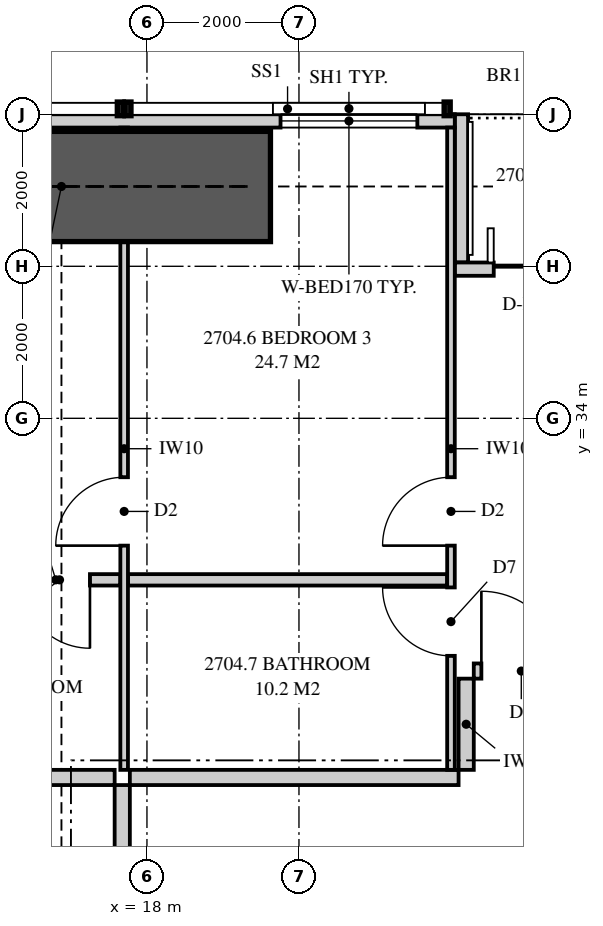
"""IFC4 building model, lengths in metres.
Left out: names, types, materials, properties, quantities, classifications, styles, units other than length and angle.
Written with IfcOpenShell. Run it as: python <this file> out.ifc"""

import sys

from ifc_helpers import new_model, si_unit, direction, frame, frame_2d, origin, place, context, subcontext, project, spatial, polyline, rectangle, outline, extrude, element, fill, save


model = new_model("IFC4")
c1 = context("Model", 3, precision=1e-05, world=origin(), true_north=direction((0.0, 1.0)))
c2 = subcontext(c1, "Body", "Model", "MODEL_VIEW")
j1 = project(units=[si_unit("LENGTHUNIT", "METRE"), si_unit("PLANEANGLEUNIT", "RADIAN")], contexts=[c1])
p1 = place(None, origin())
s1 = spatial("IfcSite", under=j1, at=p1, CompositionType="ELEMENT")
p2 = place(p1, origin())
s2 = spatial("IfcBuilding", under=s1, at=p2, CompositionType="ELEMENT")
p3 = place(p2, frame((0.0, 0.0, 101.5)))
s3 = spatial("IfcBuildingStorey", under=s2, at=p3, CompositionType="ELEMENT", Elevation=101.5)
p4 = place(p3, frame((22.05, 37.913, 0.0), z_axis=(0.0, 0.0, 1.0), x_axis=(-1.0, 0.0, 0.0)))
e1 = element("IfcWall", 1, at=p4, inside=s3, PredefinedType="SOLIDWALL", context=c2, shape_type="SweptSolid", body=[
    extrude(outline(polyline([(0.0, 0.0), (12.999, 0.0), (12.999, 3.11), (5.378, 3.11), (5.378, 2.15), (5.333, 2.15), (5.333, 3.11), (5.175, 3.11), (5.175, 2.15), (0.0, 2.15), (0.0, 0.0)])), frame((0.0, 0.087, 0.0), z_axis=(0.0, -1.0, 0.0), x_axis=(1.0, 0.0, 0.0)), (0.0, 0.0, 1.0), 0.175),
])
p5 = place(p4, frame((0.492, 0.0, 0.4)))
e2 = element("IfcOpeningElement", 2, at=p5, cuts=e1, PredefinedType="OPENING", context=c2, shape_type="SweptSolid", body=[
    extrude(rectangle(XDim=1.8, YDim=1.7, at=frame_2d((0.9, 0.85))), frame((0.0, 0.097, 0.0), z_axis=(0.0, -1.0, 0.0), x_axis=(1.0, 0.0, 0.0)), (0.0, 0.0, 1.0), 0.195),
])
p6 = place(p4, frame((8.065, 0.0, 0.4)))
e3 = element("IfcOpeningElement", 3, at=p6, cuts=e1, PredefinedType="OPENING", context=c2, shape_type="SweptSolid", body=[
    extrude(rectangle(XDim=1.8, YDim=1.7, at=frame_2d((0.9, 0.85))), frame((0.0, 0.097, 0.0), z_axis=(0.0, -1.0, 0.0), x_axis=(1.0, 0.0, 0.0)), (0.0, 0.0, 1.0), 0.195),
])
p7 = place(p3, frame((24.875, 35.962, 0.0), z_axis=(0.0, 0.0, 1.0), x_axis=(-1.0, 0.0, 0.0)))
e4 = element("IfcWall", 4, at=p7, inside=s3, PredefinedType="SOLIDWALL", context=c2, shape_type="SweptSolid", body=[
    extrude(rectangle(XDim=2.825, YDim=0.175, at=frame_2d((1.413, 0.0))), origin(), (0.0, 0.0, 1.0), 3.11),
])
p8 = place(p7, frame((0.512, 0.0, 0.0)))
e5 = element("IfcOpeningElement", 5, at=p8, cuts=e4, PredefinedType="OPENING", context=c2, shape_type="SweptSolid", body=[
    extrude(rectangle(XDim=1.8, YDim=2.1, at=frame_2d((0.9, 1.05))), frame((0.0, 0.097, 0.0), z_axis=(0.0, -1.0, 0.0), x_axis=(1.0, 0.0, 0.0)), (0.0, 0.0, 1.0), 0.195),
])
p9 = place(p3, frame((22.137, 38.0, 0.0), z_axis=(0.0, 0.0, 1.0), x_axis=(0.0, -1.0, 0.0)))
e6 = element("IfcWall", 6, at=p9, inside=s3, PredefinedType="SOLIDWALL", context=c2, shape_type="SweptSolid", body=[
    extrude(outline(polyline([(0.0, 0.0), (1.95, 0.0), (1.95, 3.11), (1.75, 3.11), (1.75, 2.15), (0.15, 2.15), (0.15, 3.11), (0.0, 3.11), (0.0, 0.0)])), frame((0.0, 0.087, 0.0), z_axis=(0.0, -1.0, 0.0), x_axis=(1.0, 0.0, 0.0)), (0.0, 0.0, 1.0), 0.175),
])
p10 = place(p3, frame((17.775, 29.275, 0.0), z_axis=(0.0, 0.0, 1.0), x_axis=(1.0, 0.0, 0.0)))
e7 = element("IfcWall", 7, at=p10, inside=s3, PredefinedType="PARTITIONING", context=c2, shape_type="SweptSolid", body=[
    extrude(rectangle(XDim=4.325, YDim=0.2, at=frame_2d((2.163, 0.0))), origin(), (0.0, 0.0, 1.0), 3.11),
])
p11 = place(p3, frame((17.7, 37.825, 0.0), z_axis=(0.0, 0.0, 1.0), x_axis=(0.0, -1.0, 0.0)))
e8 = element("IfcWall", 8, at=p11, inside=s3, PredefinedType="PARTITIONING", context=c2, shape_type="SweptSolid", body=[
    extrude(outline(polyline([(1.635, 2.15), (0.0, 2.15), (0.0, 0.0), (8.45, 0.0), (8.45, 3.11), (1.635, 3.11), (1.635, 2.15)]), holes=[polyline([(1.021, 0.116), (0.529, 0.116), (0.529, 0.906), (1.021, 0.906), (1.021, 0.116)]), polyline([(1.021, 1.244), (0.529, 1.244), (0.529, 2.034), (1.021, 2.034), (1.021, 1.244)])]), frame((0.0, 0.05, 0.0), z_axis=(0.0, -1.0, 0.0), x_axis=(1.0, 0.0, 0.0)), (0.0, 0.0, 1.0), 0.1),
])
p12 = place(p11, frame((4.6, 0.0, 0.0)))
e9 = element("IfcOpeningElement", 9, at=p12, cuts=e8, PredefinedType="OPENING", context=c2, shape_type="SweptSolid", body=[
    extrude(rectangle(XDim=0.9, YDim=2.1, at=frame_2d((0.45, 1.05))), frame((0.0, 0.06, 0.0), z_axis=(0.0, -1.0, 0.0), x_axis=(1.0, 0.0, 0.0)), (0.0, 0.0, 1.0), 0.12),
])
p13 = place(p3, frame((22.0, 37.825, 0.0), z_axis=(0.0, 0.0, 1.0), x_axis=(0.0, -1.0, 0.0)))
e10 = element("IfcWall", 10, at=p13, inside=s3, PredefinedType="PARTITIONING", context=c2, shape_type="SweptSolid", body=[
    extrude(outline(polyline([(0.0, 0.0), (8.45, 0.0), (8.45, 3.11), (1.635, 3.11), (1.635, 2.15), (0.0, 2.15), (0.0, 3.11), (0.0, 0.0)])), frame((0.0, 0.05, 0.0), z_axis=(0.0, -1.0, 0.0), x_axis=(1.0, 0.0, 0.0)), (0.0, 0.0, 1.0), 0.1),
])
p14 = place(p13, frame((4.6, 0.0, 0.0)))
e11 = element("IfcOpeningElement", 11, at=p14, cuts=e10, PredefinedType="OPENING", context=c2, shape_type="SweptSolid", body=[
    extrude(rectangle(XDim=0.9, YDim=2.1, at=frame_2d((0.45, 1.05))), frame((0.0, 0.06, 0.0), z_axis=(0.0, -1.0, 0.0), x_axis=(1.0, 0.0, 0.0)), (0.0, 0.0, 1.0), 0.12),
])
p15 = place(p13, frame((6.05, 0.0, 0.0)))
e12 = element("IfcOpeningElement", 12, at=p15, cuts=e10, PredefinedType="OPENING", context=c2, shape_type="SweptSolid", body=[
    extrude(rectangle(XDim=0.9, YDim=2.1, at=frame_2d((0.45, 1.05))), frame((0.0, 0.06, 0.0), z_axis=(0.0, -1.0, 0.0), x_axis=(1.0, 0.0, 0.0)), (0.0, 0.0, 1.0), 0.12),
])
p16 = place(p3, frame((11.75, 31.875, 0.0), z_axis=(0.0, 0.0, 1.0), x_axis=(1.0, 0.0, 0.0)))
e13 = element("IfcWall", 13, at=p16, inside=s3, PredefinedType="PLUMBINGWALL", context=c2, shape_type="SweptSolid", body=[
    extrude(outline(polyline([(0.0, 0.0), (5.9, 0.0), (5.9, 3.11), (5.438, 3.11), (5.438, 2.541), (4.812, 2.541), (4.812, 3.11), (0.0, 3.11), (0.0, 0.0)])), frame((0.0, 0.075, 0.0), z_axis=(0.0, -1.0, 0.0), x_axis=(1.0, 0.0, 0.0)), (0.0, 0.0, 1.0), 0.15),
])
p17 = place(p16, frame((4.6, 0.0, 0.0)))
e14 = element("IfcOpeningElement", 14, at=p17, cuts=e13, PredefinedType="OPENING", context=c2, shape_type="SweptSolid", body=[
    extrude(rectangle(XDim=0.9, YDim=2.1, at=frame_2d((0.45, 1.05))), frame((0.0, 0.085, 0.0), z_axis=(0.0, -1.0, 0.0), x_axis=(1.0, 0.0, 0.0)), (0.0, 0.0, 1.0), 0.17),
])
p18 = place(p3, frame((17.75, 31.875, 0.0), z_axis=(0.0, 0.0, 1.0), x_axis=(1.0, 0.0, 0.0)))
e15 = element("IfcWall", 15, at=p18, inside=s3, PredefinedType="PLUMBINGWALL", context=c2, shape_type="SweptSolid", body=[
    extrude(rectangle(XDim=4.2, YDim=0.15, at=frame_2d((2.1, 0.0))), origin(), (0.0, 0.0, 1.0), 3.11),
])
p19 = place(p3, frame((6.0, 29.275, 0.0), z_axis=(0.0, 0.0, 1.0), x_axis=(1.0, 0.0, 0.0)))
e16 = element("IfcWall", 16, at=p19, inside=s3, PredefinedType="PARTITIONING", context=c2, shape_type="SweptSolid", body=[
    extrude(outline(polyline([(0.0, 0.0), (11.575, 0.0), (11.575, 3.11), (11.212, 3.11), (11.212, 2.541), (10.538, 2.541), (10.538, 3.11), (5.51, 3.11), (5.51, 2.51), (2.969, 2.51), (2.969, 2.541), (2.565, 2.541), (2.565, 2.15), (0.721, 2.15), (0.721, 3.11), (0.0, 3.11), (0.0, 0.0)])), frame((0.0, 0.1, 0.0), z_axis=(0.0, -1.0, 0.0), x_axis=(1.0, 0.0, 0.0)), (0.0, 0.0, 1.0), 0.2),
])
p20 = place(p3, frame((22.3, 30.675, 0.0), z_axis=(0.0, 0.0, 1.0), x_axis=(1.0, 0.0, 0.0)))
e17 = element("IfcWall", 17, at=p20, inside=s3, PredefinedType="PARTITIONING", context=c2, shape_type="SweptSolid", body=[
    extrude(rectangle(XDim=2.4, YDim=0.2, at=frame_2d((1.2, 0.0))), origin(), (0.0, 0.0, 1.0), 3.11),
])
p21 = place(p20, frame((0.1, 0.0, 0.0)))
e18 = element("IfcOpeningElement", 18, at=p21, cuts=e17, PredefinedType="OPENING", context=c2, shape_type="SweptSolid", body=[
    extrude(rectangle(XDim=1.05, YDim=2.2, at=frame_2d((0.525, 1.1))), frame((0.0, 0.11, 0.0), z_axis=(0.0, -1.0, 0.0), x_axis=(1.0, 0.0, 0.0)), (0.0, 0.0, 1.0), 0.22),
])
p22 = place(p3, frame((22.2, 29.375, 0.0), z_axis=(0.0, 0.0, 1.0), x_axis=(0.0, 1.0, 0.0)))
e19 = element("IfcWall", 19, at=p22, inside=s3, PredefinedType="PARTITIONING", context=c2, shape_type="SweptSolid", body=[
    extrude(rectangle(XDim=1.2, YDim=0.2, at=frame_2d((0.6, 0.0))), origin(), (0.0, 0.0, 1.0), 3.11),
])
p23 = place(p3, frame((17.675, 23.238, 0.0), z_axis=(0.0, 0.0, 1.0), x_axis=(0.0, 1.0, 0.0)))
e20 = element("IfcWall", 20, at=p23, inside=s3, PredefinedType="PARTITIONING", context=c2, shape_type="SweptSolid", body=[
    extrude(outline(polyline([(0.0, 0.0), (5.938, 0.0), (5.938, 3.11), (3.525, 3.11), (3.525, 2.541), (2.85, 2.541), (2.85, 3.11), (0.0, 3.11), (0.0, 0.0)])), frame((0.0, 0.1, 0.0), z_axis=(0.0, -1.0, 0.0), x_axis=(1.0, 0.0, 0.0)), (0.0, 0.0, 1.0), 0.2),
])
p24 = place(p3, frame((14.125, 37.05, 0.0), z_axis=(0.0, 0.0, 1.0), x_axis=(1.0, 0.0, 0.0)))
e21 = element("IfcWall", 21, at=p24, inside=s3, PredefinedType="SHEAR", context=c2, shape_type="SweptSolid", body=[
    extrude(rectangle(XDim=5.5, YDim=1.45, at=frame_2d((2.75, 0.0))), origin(), (0.0, 0.0, 1.0), 3.35),
])
p25 = place(p8, origin())
e22 = element("IfcDoor", 22, at=p25, inside=s3, OperationType="SLIDING_TO_LEFT", PredefinedType="DOOR", context=c2, shape_type="SweptSolid", body=[
    extrude(rectangle(XDim=1.8, YDim=2.1, at=frame_2d((0.9, 1.05))), frame((0.0, 0.025, 0.0), z_axis=(0.0, -1.0, 0.0), x_axis=(1.0, 0.0, 0.0)), (0.0, 0.0, 1.0), 0.05),
])
fill(e5, e22)
p26 = place(p5, origin())
e23 = element("IfcWindow", 23, at=p26, inside=s3, PartitioningType="SINGLE_PANEL", PredefinedType="WINDOW", context=c2, shape_type="SweptSolid", body=[
    extrude(rectangle(XDim=1.8, YDim=1.7, at=frame_2d((0.9, 0.85))), frame((0.0, 0.03, 0.0), z_axis=(0.0, -1.0, 0.0), x_axis=(1.0, 0.0, 0.0)), (0.0, 0.0, 1.0), 0.06),
])
fill(e2, e23)
p27 = place(p21, origin())
e24 = element("IfcDoor", 24, at=p27, inside=s3, OperationType="SINGLE_SWING_LEFT", PredefinedType="DOOR", context=c2, shape_type="SweptSolid", body=[
    extrude(rectangle(XDim=1.05, YDim=2.2, at=frame_2d((0.525, 1.1))), frame((0.0, 0.025, 0.0), z_axis=(0.0, -1.0, 0.0), x_axis=(1.0, 0.0, 0.0)), (0.0, 0.0, 1.0), 0.05),
])
fill(e18, e24)
p28 = place(p12, frame((0.9, 0.0, 0.0), z_axis=(0.0, 0.0, 1.0), x_axis=(-1.0, 0.0, 0.0)))
e25 = element("IfcDoor", 25, at=p28, inside=s3, OperationType="SINGLE_SWING_LEFT", PredefinedType="DOOR", context=c2, shape_type="SweptSolid", body=[
    extrude(rectangle(XDim=0.9, YDim=2.1, at=frame_2d((0.45, 1.05))), frame((0.0, 0.025, 0.0), z_axis=(0.0, -1.0, 0.0), x_axis=(1.0, 0.0, 0.0)), (0.0, 0.0, 1.0), 0.05),
])
fill(e9, e25)
p29 = place(p17, frame((0.9, 0.0, 0.0), z_axis=(0.0, 0.0, 1.0), x_axis=(-1.0, 0.0, 0.0)))
e26 = element("IfcDoor", 26, at=p29, inside=s3, OperationType="SINGLE_SWING_LEFT", PredefinedType="DOOR", context=c2, shape_type="SweptSolid", body=[
    extrude(rectangle(XDim=0.9, YDim=2.1, at=frame_2d((0.45, 1.05))), frame((0.0, 0.025, 0.0), z_axis=(0.0, -1.0, 0.0), x_axis=(1.0, 0.0, 0.0)), (0.0, 0.0, 1.0), 0.05),
])
fill(e14, e26)
p30 = place(p14, frame((0.9, 0.0, 0.0), z_axis=(0.0, 0.0, 1.0), x_axis=(-1.0, 0.0, 0.0)))
e27 = element("IfcDoor", 27, at=p30, inside=s3, OperationType="SINGLE_SWING_LEFT", PredefinedType="DOOR", context=c2, shape_type="SweptSolid", body=[
    extrude(rectangle(XDim=0.9, YDim=2.1, at=frame_2d((0.45, 1.05))), frame((0.0, 0.025, 0.0), z_axis=(0.0, -1.0, 0.0), x_axis=(1.0, 0.0, 0.0)), (0.0, 0.0, 1.0), 0.05),
])
fill(e11, e27)
p31 = place(p15, frame((0.9, 0.0, 0.0), z_axis=(0.0, 0.0, 1.0), x_axis=(-1.0, 0.0, 0.0)))
e28 = element("IfcDoor", 28, at=p31, inside=s3, OperationType="SINGLE_SWING_RIGHT", PredefinedType="DOOR", context=c2, shape_type="SweptSolid", body=[
    extrude(rectangle(XDim=0.9, YDim=2.1, at=frame_2d((0.45, 1.05))), frame((0.0, 0.025, 0.0), z_axis=(0.0, -1.0, 0.0), x_axis=(1.0, 0.0, 0.0)), (0.0, 0.0, 1.0), 0.05),
])
fill(e12, e28)
save(model, sys.argv[1])
